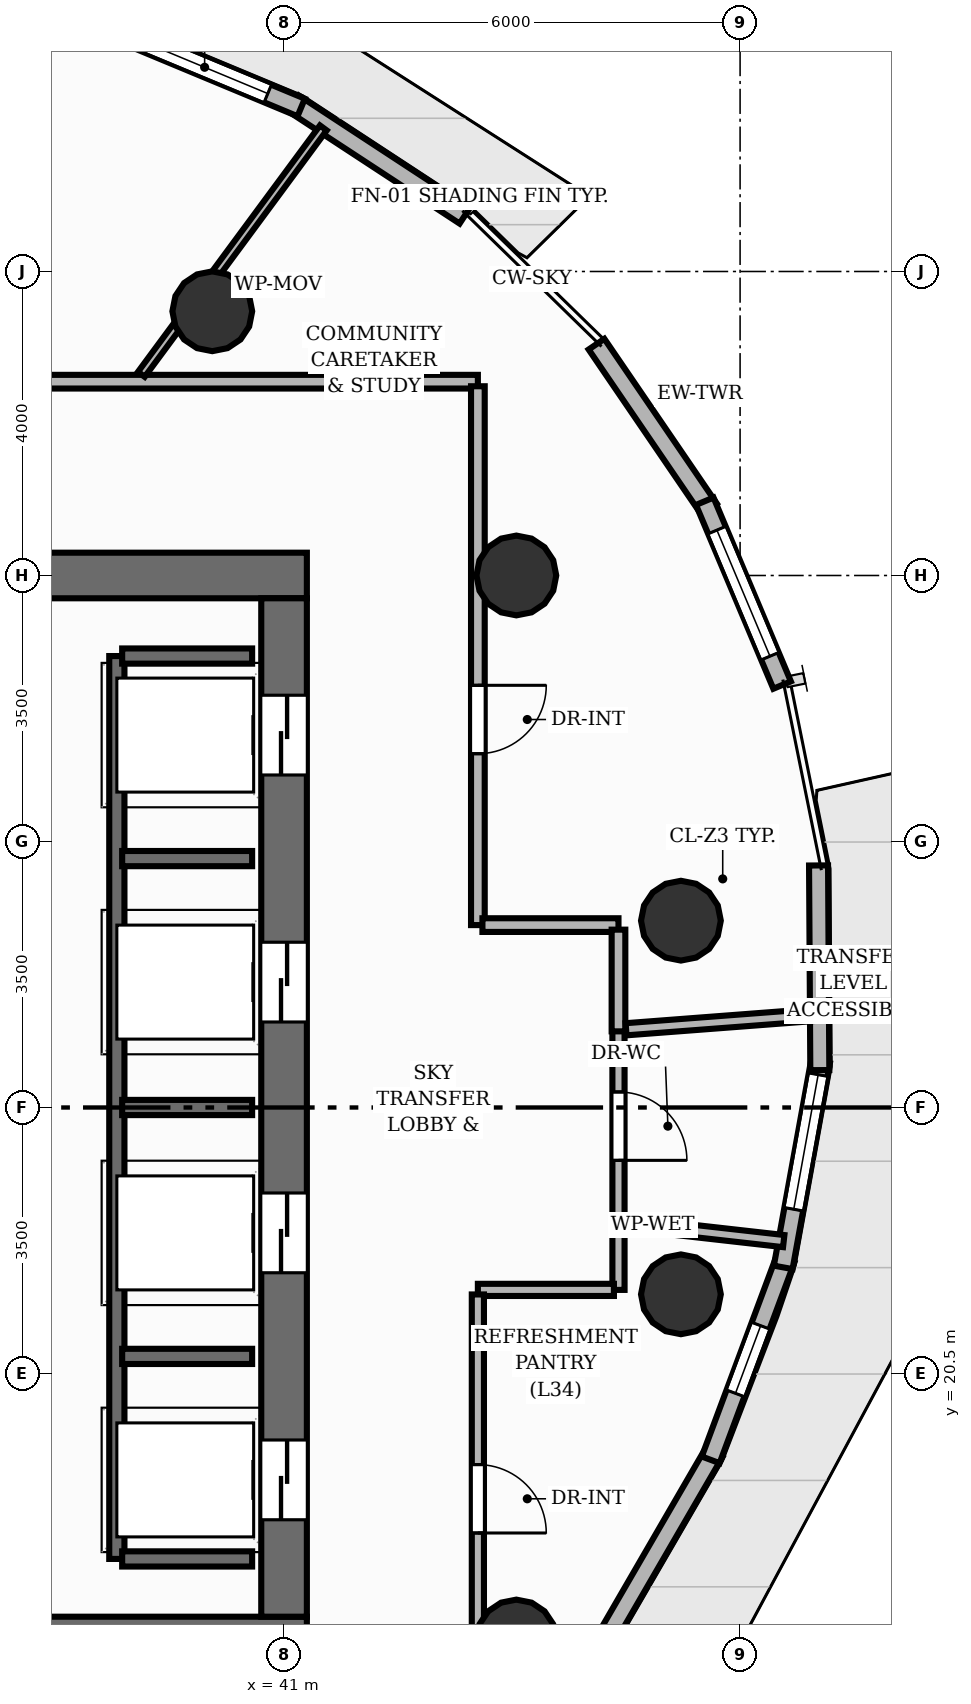
"""IFC4 building model, lengths in metres.
Left out: names, types, materials, properties, quantities, classifications, styles, units other than length and angle.
Written with IfcOpenShell. Run it as: python <this file> out.ifc"""

import sys

from ifc_helpers import new_model, si_unit, direction, frame, frame_2d, origin, origin_2d, place, context, subcontext, project, spatial, rectangle, circle, extrude, element, fill, save


model = new_model("IFC4")
c1 = context("Model", 3, precision=1e-05, world=origin(), true_north=direction((0.0, 1.0)))
c2 = subcontext(c1, "Body", "Model", "MODEL_VIEW")
j1 = project(units=[si_unit("LENGTHUNIT", "METRE"), si_unit("PLANEANGLEUNIT", "RADIAN")], contexts=[c1])
p1 = place(None, origin())
s1 = spatial("IfcSite", under=j1, at=p1, CompositionType="ELEMENT")
p2 = place(p1, origin())
s2 = spatial("IfcBuilding", under=s1, at=p2, CompositionType="ELEMENT")
p3 = place(p2, frame((0.0, 0.0, 116.96)))
s3 = spatial("IfcBuildingStorey", under=s2, at=p3, CompositionType="ELEMENT", Elevation=116.96)
p4 = place(p3, frame((22.7, 17.0, 0.0), z_axis=(0.0, 0.0, 1.0), x_axis=(1.0, 0.0, 0.0)))
e1 = element("IfcWall", 1, at=p4, inside=s3, PredefinedType="SHEAR", context=c2, shape_type="SweptSolid", body=[
    extrude(rectangle(XDim=18.6, YDim=0.6, at=frame_2d((9.3, 0.0))), origin(), (0.0, 0.0, 1.0), 3.2),
])
p5 = place(p4, frame((5.8, 0.0, 0.0)))
e2 = element("IfcOpeningElement", 2, at=p5, cuts=e1, PredefinedType="OPENING", context=c2, shape_type="SweptSolid", body=[
    extrude(rectangle(XDim=1.1, YDim=2.15, at=frame_2d((0.55, 1.075))), frame((0.0, 0.31, 0.0), z_axis=(0.0, -1.0, 0.0), x_axis=(1.0, 0.0, 0.0)), (0.0, 0.0, 1.0), 0.62),
])
p6 = place(p4, frame((9.35, 0.0, 0.0)))
e3 = element("IfcOpeningElement", 3, at=p6, cuts=e1, PredefinedType="OPENING", context=c2, shape_type="SweptSolid", body=[
    extrude(rectangle(XDim=0.9, YDim=2.1, at=frame_2d((0.45, 1.05))), frame((0.0, 0.31, 0.0), z_axis=(0.0, -1.0, 0.0), x_axis=(1.0, 0.0, 0.0)), (0.0, 0.0, 1.0), 0.62),
])
p7 = place(p3, frame((22.7, 31.0, 0.0), z_axis=(0.0, 0.0, 1.0), x_axis=(1.0, 0.0, 0.0)))
e4 = element("IfcWall", 4, at=p7, inside=s3, PredefinedType="SHEAR", context=c2, shape_type="SweptSolid", body=[
    extrude(rectangle(XDim=18.6, YDim=0.6, at=frame_2d((9.3, 0.0))), origin(), (0.0, 0.0, 1.0), 3.2),
])
p8 = place(p7, frame((11.7, 0.0, 0.0)))
e5 = element("IfcOpeningElement", 5, at=p8, cuts=e4, PredefinedType="OPENING", context=c2, shape_type="SweptSolid", body=[
    extrude(rectangle(XDim=1.1, YDim=2.15, at=frame_2d((0.55, 1.075))), frame((0.0, 0.31, 0.0), z_axis=(0.0, -1.0, 0.0), x_axis=(1.0, 0.0, 0.0)), (0.0, 0.0, 1.0), 0.62),
])
p9 = place(p7, frame((4.325, 0.0, 0.0)))
e6 = element("IfcOpeningElement", 6, at=p9, cuts=e4, PredefinedType="OPENING", context=c2, shape_type="SweptSolid", body=[
    extrude(rectangle(XDim=1.05, YDim=2.15, at=frame_2d((0.525, 1.075))), frame((0.0, 0.31, 0.0), z_axis=(0.0, -1.0, 0.0), x_axis=(1.0, 0.0, 0.0)), (0.0, 0.0, 1.0), 0.62),
])
p10 = place(p7, frame((6.075, 0.0, 0.0)))
e7 = element("IfcOpeningElement", 7, at=p10, cuts=e4, PredefinedType="OPENING", context=c2, shape_type="SweptSolid", body=[
    extrude(rectangle(XDim=1.05, YDim=2.15, at=frame_2d((0.525, 1.075))), frame((0.0, 0.31, 0.0), z_axis=(0.0, -1.0, 0.0), x_axis=(1.0, 0.0, 0.0)), (0.0, 0.0, 1.0), 0.62),
])
p11 = place(p7, frame((7.825, 0.0, 0.0)))
e8 = element("IfcOpeningElement", 8, at=p11, cuts=e4, PredefinedType="OPENING", context=c2, shape_type="SweptSolid", body=[
    extrude(rectangle(XDim=1.05, YDim=2.15, at=frame_2d((0.525, 1.075))), frame((0.0, 0.31, 0.0), z_axis=(0.0, -1.0, 0.0), x_axis=(1.0, 0.0, 0.0)), (0.0, 0.0, 1.0), 0.62),
])
p12 = place(p3, frame((41.0, 17.3, 0.0), z_axis=(0.0, 0.0, 1.0), x_axis=(0.0, 1.0, 0.0)))
e9 = element("IfcWall", 9, at=p12, inside=s3, PredefinedType="SHEAR", context=c2, shape_type="SweptSolid", body=[
    extrude(rectangle(XDim=13.4, YDim=0.6, at=frame_2d((6.7, 0.0))), origin(), (0.0, 0.0, 1.0), 3.2),
])
p13 = place(p12, frame((1.275, 0.0, 0.0)))
e10 = element("IfcOpeningElement", 10, at=p13, cuts=e9, PredefinedType="OPENING", context=c2, shape_type="SweptSolid", body=[
    extrude(rectangle(XDim=1.05, YDim=2.15, at=frame_2d((0.525, 1.075))), frame((0.0, 0.31, 0.0), z_axis=(0.0, -1.0, 0.0), x_axis=(1.0, 0.0, 0.0)), (0.0, 0.0, 1.0), 0.62),
])
p14 = place(p12, frame((4.525, 0.0, 0.0)))
e11 = element("IfcOpeningElement", 11, at=p14, cuts=e9, PredefinedType="OPENING", context=c2, shape_type="SweptSolid", body=[
    extrude(rectangle(XDim=1.05, YDim=2.15, at=frame_2d((0.525, 1.075))), frame((0.0, 0.31, 0.0), z_axis=(0.0, -1.0, 0.0), x_axis=(1.0, 0.0, 0.0)), (0.0, 0.0, 1.0), 0.62),
])
p15 = place(p12, frame((7.825, 0.0, 0.0)))
e12 = element("IfcOpeningElement", 12, at=p15, cuts=e9, PredefinedType="OPENING", context=c2, shape_type="SweptSolid", body=[
    extrude(rectangle(XDim=1.05, YDim=2.15, at=frame_2d((0.525, 1.075))), frame((0.0, 0.31, 0.0), z_axis=(0.0, -1.0, 0.0), x_axis=(1.0, 0.0, 0.0)), (0.0, 0.0, 1.0), 0.62),
])
p16 = place(p12, frame((11.075, 0.0, 0.0)))
e13 = element("IfcOpeningElement", 13, at=p16, cuts=e9, PredefinedType="OPENING", context=c2, shape_type="SweptSolid", body=[
    extrude(rectangle(XDim=1.05, YDim=2.15, at=frame_2d((0.525, 1.075))), frame((0.0, 0.31, 0.0), z_axis=(0.0, -1.0, 0.0), x_axis=(1.0, 0.0, 0.0)), (0.0, 0.0, 1.0), 0.62),
])
for number, where, z_axis, x_axis in (
    (14, (46.221, 26.458, 0.0), (0.0, 0.0, 1.0), (1.0, 0.0, 0.0)),
    (15, (44.056, 31.0, 0.0), (0.0, 0.0, 1.0), (1.0, 0.0, 0.0)),
    (16, (40.056, 34.477, 0.0), (0.0, 0.0, 1.0), (1.0, 0.0, 0.0)),
    (17, (44.056, 17.0, 0.0), (0.0, 0.0, 1.0), (1.0, 0.0, 0.0)),
    (18, (46.221, 21.542, 0.0), (0.0, 0.0, 1.0), (1.0, 0.0, 0.0)),
):
    element("IfcColumn", number, at=place(p3, frame(where, z_axis=z_axis, x_axis=x_axis)), inside=s3, PredefinedType="COLUMN", context=c2, shape_type="SweptSolid", body=[
        extrude(circle(Radius=0.525, at=origin_2d()), origin(), (0.0, 0.0, 1.0), 3.2),
    ])
p17 = place(p3, frame((45.111, 34.044, 0.0), z_axis=(0.0, 0.0, 1.0), x_axis=(0.563599495618, -0.826048187783, 0.0)))
e19 = element("IfcWall", 19, at=p17, inside=s3, PredefinedType="SOLIDWALL", context=c2, shape_type="SweptSolid", body=[
    extrude(rectangle(XDim=2.624, YDim=0.25, at=frame_2d((1.312, 0.0))), origin(), (0.0, 0.0, 1.0), 2.96),
])
p18 = place(p3, frame((41.126, 37.211, 0.0), z_axis=(0.0, 0.0, 1.0), x_axis=(0.836445365251, -0.5480503179, 0.0)))
e20 = element("IfcWall", 20, at=p18, inside=s3, PredefinedType="SOLIDWALL", context=c2, shape_type="SweptSolid", body=[
    extrude(rectangle(XDim=2.693, YDim=0.25, at=frame_2d((1.346, 0.0))), origin(), (0.0, 0.0, 1.0), 2.96),
])
p19 = place(p3, frame((38.685, 38.216, 0.0), z_axis=(0.0, 0.0, 1.0), x_axis=(0.923242191478, -0.384218500172, 0.0)))
e21 = element("IfcWall", 21, at=p19, inside=s3, PredefinedType="SOLIDWALL", context=c2, shape_type="SweptSolid", body=[
    extrude(rectangle(XDim=2.752, YDim=0.25, at=frame_2d((1.376, 0.0))), origin(), (0.0, 0.0, 1.0), 2.96),
])
p20 = place(p19, frame((0.476, 0.0, 0.85)))
e22 = element("IfcOpeningElement", 22, at=p20, cuts=e21, PredefinedType="OPENING", context=c2, shape_type="SweptSolid", body=[
    extrude(rectangle(XDim=1.8, YDim=2.0, at=frame_2d((0.9, 1.0))), frame((0.0, 0.135, 0.0), z_axis=(0.0, -1.0, 0.0), x_axis=(1.0, 0.0, 0.0)), (0.0, 0.0, 1.0), 0.27),
])
p21 = place(p3, frame((46.66, 19.464, 0.0), z_axis=(0.0, 0.0, 1.0), x_axis=(-0.501630602612, -0.865081925903, 0.0)))
e23 = element("IfcWall", 23, at=p21, inside=s3, PredefinedType="SOLIDWALL", context=c2, shape_type="SweptSolid", body=[
    extrude(rectangle(XDim=2.882, YDim=0.25, at=frame_2d((1.441, 0.0))), origin(), (0.0, 0.0, 1.0), 2.96),
])
p22 = place(p3, frame((47.597, 22.004, 0.0), z_axis=(0.0, 0.0, 1.0), x_axis=(-0.349100071797, -0.93708544961, 0.0)))
e24 = element("IfcWall", 24, at=p22, inside=s3, PredefinedType="SOLIDWALL", context=c2, shape_type="SweptSolid", body=[
    extrude(rectangle(XDim=2.818, YDim=0.25, at=frame_2d((1.409, 0.0))), origin(), (0.0, 0.0, 1.0), 2.96),
])
p23 = place(p22, frame((0.934, 0.0, 0.85)))
e25 = element("IfcOpeningElement", 25, at=p23, cuts=e24, PredefinedType="OPENING", context=c2, shape_type="SweptSolid", body=[
    extrude(rectangle(XDim=0.95, YDim=1.45, at=frame_2d((0.475, 0.725))), frame((0.0, 0.135, 0.0), z_axis=(0.0, -1.0, 0.0), x_axis=(1.0, 0.0, 0.0)), (0.0, 0.0, 1.0), 0.27),
])
p24 = place(p3, frame((48.059, 24.604, 0.0), z_axis=(0.0, 0.0, 1.0), x_axis=(-0.178495077034, -0.983940804863, 0.0)))
e26 = element("IfcWall", 26, at=p24, inside=s3, PredefinedType="SOLIDWALL", context=c2, shape_type="SweptSolid", body=[
    extrude(rectangle(XDim=2.752, YDim=0.25, at=frame_2d((1.376, 0.0))), origin(), (0.0, 0.0, 1.0), 2.96),
])
p25 = place(p24, frame((0.175, 0.0, 0.85)))
e27 = element("IfcOpeningElement", 27, at=p25, cuts=e26, PredefinedType="OPENING", context=c2, shape_type="SweptSolid", body=[
    extrude(rectangle(XDim=1.8, YDim=2.0, at=frame_2d((0.9, 1.0))), frame((0.0, 0.135, 0.0), z_axis=(0.0, -1.0, 0.0), x_axis=(1.0, 0.0, 0.0)), (0.0, 0.0, 1.0), 0.27),
])
p26 = place(p3, frame((48.032, 27.185, 0.0), z_axis=(0.0, 0.0, 1.0), x_axis=(0.006164887379, -0.999980996901, 0.0)))
e28 = element("IfcWall", 28, at=p26, inside=s3, PredefinedType="SOLIDWALL", context=c2, shape_type="SweptSolid", body=[
    extrude(rectangle(XDim=2.693, YDim=0.25, at=frame_2d((1.346, 0.0))), origin(), (0.0, 0.0, 1.0), 2.96),
])
p27 = place(p3, frame((46.535, 31.977, 0.0), z_axis=(0.0, 0.0, 1.0), x_axis=(0.387790779971, -0.921747422546, 0.0)))
e29 = element("IfcWall", 29, at=p27, inside=s3, PredefinedType="SOLIDWALL", context=c2, shape_type="SweptSolid", body=[
    extrude(rectangle(XDim=2.624, YDim=0.25, at=frame_2d((1.312, 0.0))), origin(), (0.0, 0.0, 1.0), 2.96),
])
p28 = place(p27, frame((0.412, 0.0, 0.85)))
e30 = element("IfcOpeningElement", 30, at=p28, cuts=e29, PredefinedType="OPENING", context=c2, shape_type="SweptSolid", body=[
    extrude(rectangle(XDim=1.8, YDim=2.0, at=frame_2d((0.9, 1.0))), frame((0.0, 0.135, 0.0), z_axis=(0.0, -1.0, 0.0), x_axis=(1.0, 0.0, 0.0)), (0.0, 0.0, 1.0), 0.27),
])
p29 = place(p3, frame((38.8, 18.06, 0.0), z_axis=(0.0, 0.0, 1.0), x_axis=(0.0, 1.0, 0.0)))
e31 = element("IfcWall", 31, at=p29, inside=s3, PredefinedType="SHEAR", context=c2, shape_type="SweptSolid", body=[
    extrude(rectangle(XDim=11.88, YDim=0.2, at=frame_2d((5.94, 0.0))), origin(), (0.0, 0.0, 1.0), 3.2),
])
for number, where, z_axis, x_axis in (
    (32, (38.87, 18.06, 0.0), (0.0, 0.0, 1.0), (1.0, 0.0, 0.0)),
    (33, (38.87, 29.94, 0.0), (0.0, 0.0, 1.0), (1.0, 0.0, 0.0)),
    (34, (38.87, 20.725, 0.0), (0.0, 0.0, 1.0), (1.0, 0.0, 0.0)),
    (35, (38.87, 24.0, 0.0), (0.0, 0.0, 1.0), (1.0, 0.0, 0.0)),
    (36, (38.87, 27.275, 0.0), (0.0, 0.0, 1.0), (1.0, 0.0, 0.0)),
):
    element("IfcWall", number, at=place(p3, frame(where, z_axis=z_axis, x_axis=x_axis)), inside=s3, PredefinedType="SHEAR", context=c2, shape_type="SweptSolid", body=[
        extrude(rectangle(XDim=1.71, YDim=0.2, at=frame_2d((0.855, 0.0))), origin(), (0.0, 0.0, 1.0), 3.2),
    ])
p30 = place(p3, frame((21.153, 33.55, 0.0), z_axis=(0.0, 0.0, 1.0), x_axis=(1.0, 0.0, 0.0)))
e37 = element("IfcWall", 37, at=p30, inside=s3, PredefinedType="PARTITIONING", context=c2, shape_type="SweptSolid", body=[
    extrude(rectangle(XDim=22.397, YDim=0.18, at=frame_2d((11.199, 0.0))), origin(), (0.0, 0.0, 1.0), 2.955),
])
p31 = place(p30, frame((8.512, 0.0, 0.0)))
e38 = element("IfcOpeningElement", 38, at=p31, cuts=e37, PredefinedType="OPENING", context=c2, shape_type="SweptSolid", body=[
    extrude(rectangle(XDim=0.9, YDim=2.1, at=frame_2d((0.45, 1.05))), frame((0.0, 0.1, 0.0), z_axis=(0.0, -1.0, 0.0), x_axis=(1.0, 0.0, 0.0)), (0.0, 0.0, 1.0), 0.2),
])
p32 = place(p3, frame((45.4, 25.042, 0.0), z_axis=(0.0, 0.0, 1.0), x_axis=(0.0, -1.0, 0.0)))
e39 = element("IfcWall", 39, at=p32, inside=s3, PredefinedType="PLUMBINGWALL", context=c2, shape_type="SweptSolid", body=[
    extrude(rectangle(XDim=3.442, YDim=0.16, at=frame_2d((1.721, 0.0))), origin(), (0.0, 0.0, 1.0), 2.955),
])
p33 = place(p32, frame((0.837, 0.0, 0.0)))
e40 = element("IfcOpeningElement", 40, at=p33, cuts=e39, PredefinedType="OPENING", context=c2, shape_type="SweptSolid", body=[
    extrude(rectangle(XDim=0.9, YDim=2.1, at=frame_2d((0.45, 1.05))), frame((0.0, 0.09, 0.0), z_axis=(0.0, -1.0, 0.0), x_axis=(1.0, 0.0, 0.0)), (0.0, 0.0, 1.0), 0.18),
])
p34 = place(p3, frame((45.34, 21.6, 0.0), z_axis=(0.0, 0.0, 1.0), x_axis=(-1.0, 0.0, 0.0)))
e41 = element("IfcWall", 41, at=p34, inside=s3, PredefinedType="PLUMBINGWALL", context=c2, shape_type="SweptSolid", body=[
    extrude(rectangle(XDim=1.79, YDim=0.16, at=frame_2d((0.895, 0.0))), origin(), (0.0, 0.0, 1.0), 2.336),
])
p35 = place(p3, frame((43.55, 21.54, 0.0), z_axis=(0.0, 0.0, 1.0), x_axis=(0.0, -1.0, 0.0)))
e42 = element("IfcWall", 42, at=p35, inside=s3, PredefinedType="PLUMBINGWALL", context=c2, shape_type="SweptSolid", body=[
    extrude(rectangle(XDim=6.497, YDim=0.16, at=frame_2d((3.249, 0.0))), origin(), (0.0, 0.0, 1.0), 2.955),
])
p36 = place(p35, frame((2.239, 0.0, 0.0)))
e43 = element("IfcOpeningElement", 43, at=p36, cuts=e42, PredefinedType="OPENING", context=c2, shape_type="SweptSolid", body=[
    extrude(rectangle(XDim=0.9, YDim=2.1, at=frame_2d((0.45, 1.05))), frame((0.0, 0.09, 0.0), z_axis=(0.0, -1.0, 0.0), x_axis=(1.0, 0.0, 0.0)), (0.0, 0.0, 1.0), 0.18),
])
p37 = place(p3, frame((43.55, 33.49, 0.0), z_axis=(0.0, 0.0, 1.0), x_axis=(0.0, -1.0, 0.0)))
e44 = element("IfcWall", 44, at=p37, inside=s3, PredefinedType="PARTITIONING", context=c2, shape_type="SweptSolid", body=[
    extrude(rectangle(XDim=7.09, YDim=0.18, at=frame_2d((3.545, 0.0))), origin(), (0.0, 0.0, 1.0), 2.955),
])
p38 = place(p37, frame((3.935, 0.0, 0.0)))
e45 = element("IfcOpeningElement", 45, at=p38, cuts=e44, PredefinedType="OPENING", context=c2, shape_type="SweptSolid", body=[
    extrude(rectangle(XDim=0.9, YDim=2.1, at=frame_2d((0.45, 1.05))), frame((0.0, 0.1, 0.0), z_axis=(0.0, -1.0, 0.0), x_axis=(1.0, 0.0, 0.0)), (0.0, 0.0, 1.0), 0.2),
])
p39 = place(p3, frame((43.61, 26.4, 0.0), z_axis=(0.0, 0.0, 1.0), x_axis=(1.0, 0.0, 0.0)))
e46 = element("IfcWall", 46, at=p39, inside=s3, PredefinedType="PARTITIONING", context=c2, shape_type="SweptSolid", body=[
    extrude(rectangle(XDim=1.79, YDim=0.18, at=frame_2d((0.895, 0.0))), origin(), (0.0, 0.0, 1.0), 2.336),
])
p40 = place(p3, frame((45.4, 26.34, 0.0), z_axis=(0.0, 0.0, 1.0), x_axis=(0.0, -1.0, 0.0)))
e47 = element("IfcWall", 47, at=p40, inside=s3, PredefinedType="PARTITIONING", context=c2, shape_type="SweptSolid", body=[
    extrude(rectangle(XDim=1.338, YDim=0.18, at=frame_2d((0.669, 0.0))), origin(), (0.0, 0.0, 1.0), 2.955),
])
p41 = place(p3, frame((41.517, 36.889, 0.0), z_axis=(0.0, 0.0, 1.0), x_axis=(-0.593954984118, -0.804498276469, 0.0)))
e48 = element("IfcWall", 48, at=p41, inside=s3, PredefinedType="MOVABLE", context=c2, shape_type="SweptSolid", body=[
    extrude(rectangle(XDim=4.031, YDim=0.11, at=frame_2d((2.015, 0.0))), origin(), (0.0, 0.0, 1.0), 2.336),
])
p42 = place(p3, frame((45.479, 22.479, 0.0), z_axis=(0.0, 0.0, 1.0), x_axis=(0.993695883818, -0.1121092792, 0.0)))
e49 = element("IfcWall", 49, at=p42, inside=s3, PredefinedType="PLUMBINGWALL", context=c2, shape_type="SweptSolid", body=[
    extrude(rectangle(XDim=2.108, YDim=0.16, at=frame_2d((1.054, 0.0))), origin(), (0.0, 0.0, 1.0), 2.955),
])
p43 = place(p3, frame((47.99, 25.219, 0.0), z_axis=(0.0, 0.0, 1.0), x_axis=(-0.997110011019, -0.075971217745, 0.0)))
e50 = element("IfcWall", 50, at=p43, inside=s3, PredefinedType="PLUMBINGWALL", context=c2, shape_type="SweptSolid", body=[
    extrude(rectangle(XDim=2.497, YDim=0.16, at=frame_2d((1.249, 0.0))), origin(), (0.0, 0.0, 1.0), 2.955),
])
p44 = place(p20, origin())
e51 = element("IfcWindow", 51, at=p44, inside=s3, PartitioningType="SINGLE_PANEL", PredefinedType="WINDOW", context=c2, shape_type="SweptSolid", body=[
    extrude(rectangle(XDim=1.8, YDim=2.0, at=frame_2d((0.9, 1.0))), frame((0.0, 0.03, 0.0), z_axis=(0.0, -1.0, 0.0), x_axis=(1.0, 0.0, 0.0)), (0.0, 0.0, 1.0), 0.06),
])
fill(e22, e51)
p45 = place(p23, origin())
e52 = element("IfcWindow", 52, at=p45, inside=s3, PartitioningType="SINGLE_PANEL", PredefinedType="WINDOW", context=c2, shape_type="SweptSolid", body=[
    extrude(rectangle(XDim=0.95, YDim=1.45, at=frame_2d((0.475, 0.725))), frame((0.0, 0.03, 0.0), z_axis=(0.0, -1.0, 0.0), x_axis=(1.0, 0.0, 0.0)), (0.0, 0.0, 1.0), 0.06),
])
fill(e25, e52)
p46 = place(p25, origin())
e53 = element("IfcWindow", 53, at=p46, inside=s3, PartitioningType="SINGLE_PANEL", PredefinedType="WINDOW", context=c2, shape_type="SweptSolid", body=[
    extrude(rectangle(XDim=1.8, YDim=2.0, at=frame_2d((0.9, 1.0))), frame((0.0, 0.03, 0.0), z_axis=(0.0, -1.0, 0.0), x_axis=(1.0, 0.0, 0.0)), (0.0, 0.0, 1.0), 0.06),
])
fill(e27, e53)
p47 = place(p28, origin())
e54 = element("IfcWindow", 54, at=p47, inside=s3, PartitioningType="SINGLE_PANEL", PredefinedType="WINDOW", context=c2, shape_type="SweptSolid", body=[
    extrude(rectangle(XDim=1.8, YDim=2.0, at=frame_2d((0.9, 1.0))), frame((0.0, 0.03, 0.0), z_axis=(0.0, -1.0, 0.0), x_axis=(1.0, 0.0, 0.0)), (0.0, 0.0, 1.0), 0.06),
])
fill(e30, e54)
p48 = place(p13, origin())
e55 = element("IfcDoor", 55, at=p48, inside=s3, OperationType="DOUBLE_DOOR_SLIDING", PredefinedType="DOOR", context=c2, shape_type="SweptSolid", body=[
    extrude(rectangle(XDim=1.05, YDim=2.15, at=frame_2d((0.525, 1.075))), frame((0.0, 0.025, 0.0), z_axis=(0.0, -1.0, 0.0), x_axis=(1.0, 0.0, 0.0)), (0.0, 0.0, 1.0), 0.05),
])
fill(e10, e55)
p49 = place(p14, origin())
e56 = element("IfcDoor", 56, at=p49, inside=s3, OperationType="DOUBLE_DOOR_SLIDING", PredefinedType="DOOR", context=c2, shape_type="SweptSolid", body=[
    extrude(rectangle(XDim=1.05, YDim=2.15, at=frame_2d((0.525, 1.075))), frame((0.0, 0.025, 0.0), z_axis=(0.0, -1.0, 0.0), x_axis=(1.0, 0.0, 0.0)), (0.0, 0.0, 1.0), 0.05),
])
fill(e11, e56)
p50 = place(p15, origin())
e57 = element("IfcDoor", 57, at=p50, inside=s3, OperationType="DOUBLE_DOOR_SLIDING", PredefinedType="DOOR", context=c2, shape_type="SweptSolid", body=[
    extrude(rectangle(XDim=1.05, YDim=2.15, at=frame_2d((0.525, 1.075))), frame((0.0, 0.025, 0.0), z_axis=(0.0, -1.0, 0.0), x_axis=(1.0, 0.0, 0.0)), (0.0, 0.0, 1.0), 0.05),
])
fill(e12, e57)
p51 = place(p16, origin())
e58 = element("IfcDoor", 58, at=p51, inside=s3, OperationType="DOUBLE_DOOR_SLIDING", PredefinedType="DOOR", context=c2, shape_type="SweptSolid", body=[
    extrude(rectangle(XDim=1.05, YDim=2.15, at=frame_2d((0.525, 1.075))), frame((0.0, 0.025, 0.0), z_axis=(0.0, -1.0, 0.0), x_axis=(1.0, 0.0, 0.0)), (0.0, 0.0, 1.0), 0.05),
])
fill(e13, e58)
p52 = place(p36, origin())
e59 = element("IfcDoor", 59, at=p52, inside=s3, OperationType="SINGLE_SWING_RIGHT", PredefinedType="DOOR", context=c2, shape_type="SweptSolid", body=[
    extrude(rectangle(XDim=0.9, YDim=2.1, at=frame_2d((0.45, 1.05))), frame((0.0, 0.025, 0.0), z_axis=(0.0, -1.0, 0.0), x_axis=(1.0, 0.0, 0.0)), (0.0, 0.0, 1.0), 0.05),
])
fill(e43, e59)
p53 = place(p38, origin())
e60 = element("IfcDoor", 60, at=p53, inside=s3, OperationType="SINGLE_SWING_LEFT", PredefinedType="DOOR", context=c2, shape_type="SweptSolid", body=[
    extrude(rectangle(XDim=0.9, YDim=2.1, at=frame_2d((0.45, 1.05))), frame((0.0, 0.025, 0.0), z_axis=(0.0, -1.0, 0.0), x_axis=(1.0, 0.0, 0.0)), (0.0, 0.0, 1.0), 0.05),
])
fill(e45, e60)
p54 = place(p33, origin())
e61 = element("IfcDoor", 61, at=p54, inside=s3, OperationType="SINGLE_SWING_RIGHT", PredefinedType="DOOR", context=c2, shape_type="SweptSolid", body=[
    extrude(rectangle(XDim=0.9, YDim=2.1, at=frame_2d((0.45, 1.05))), frame((0.0, 0.025, 0.0), z_axis=(0.0, -1.0, 0.0), x_axis=(1.0, 0.0, 0.0)), (0.0, 0.0, 1.0), 0.05),
])
fill(e40, e61)
save(model, sys.argv[1])
